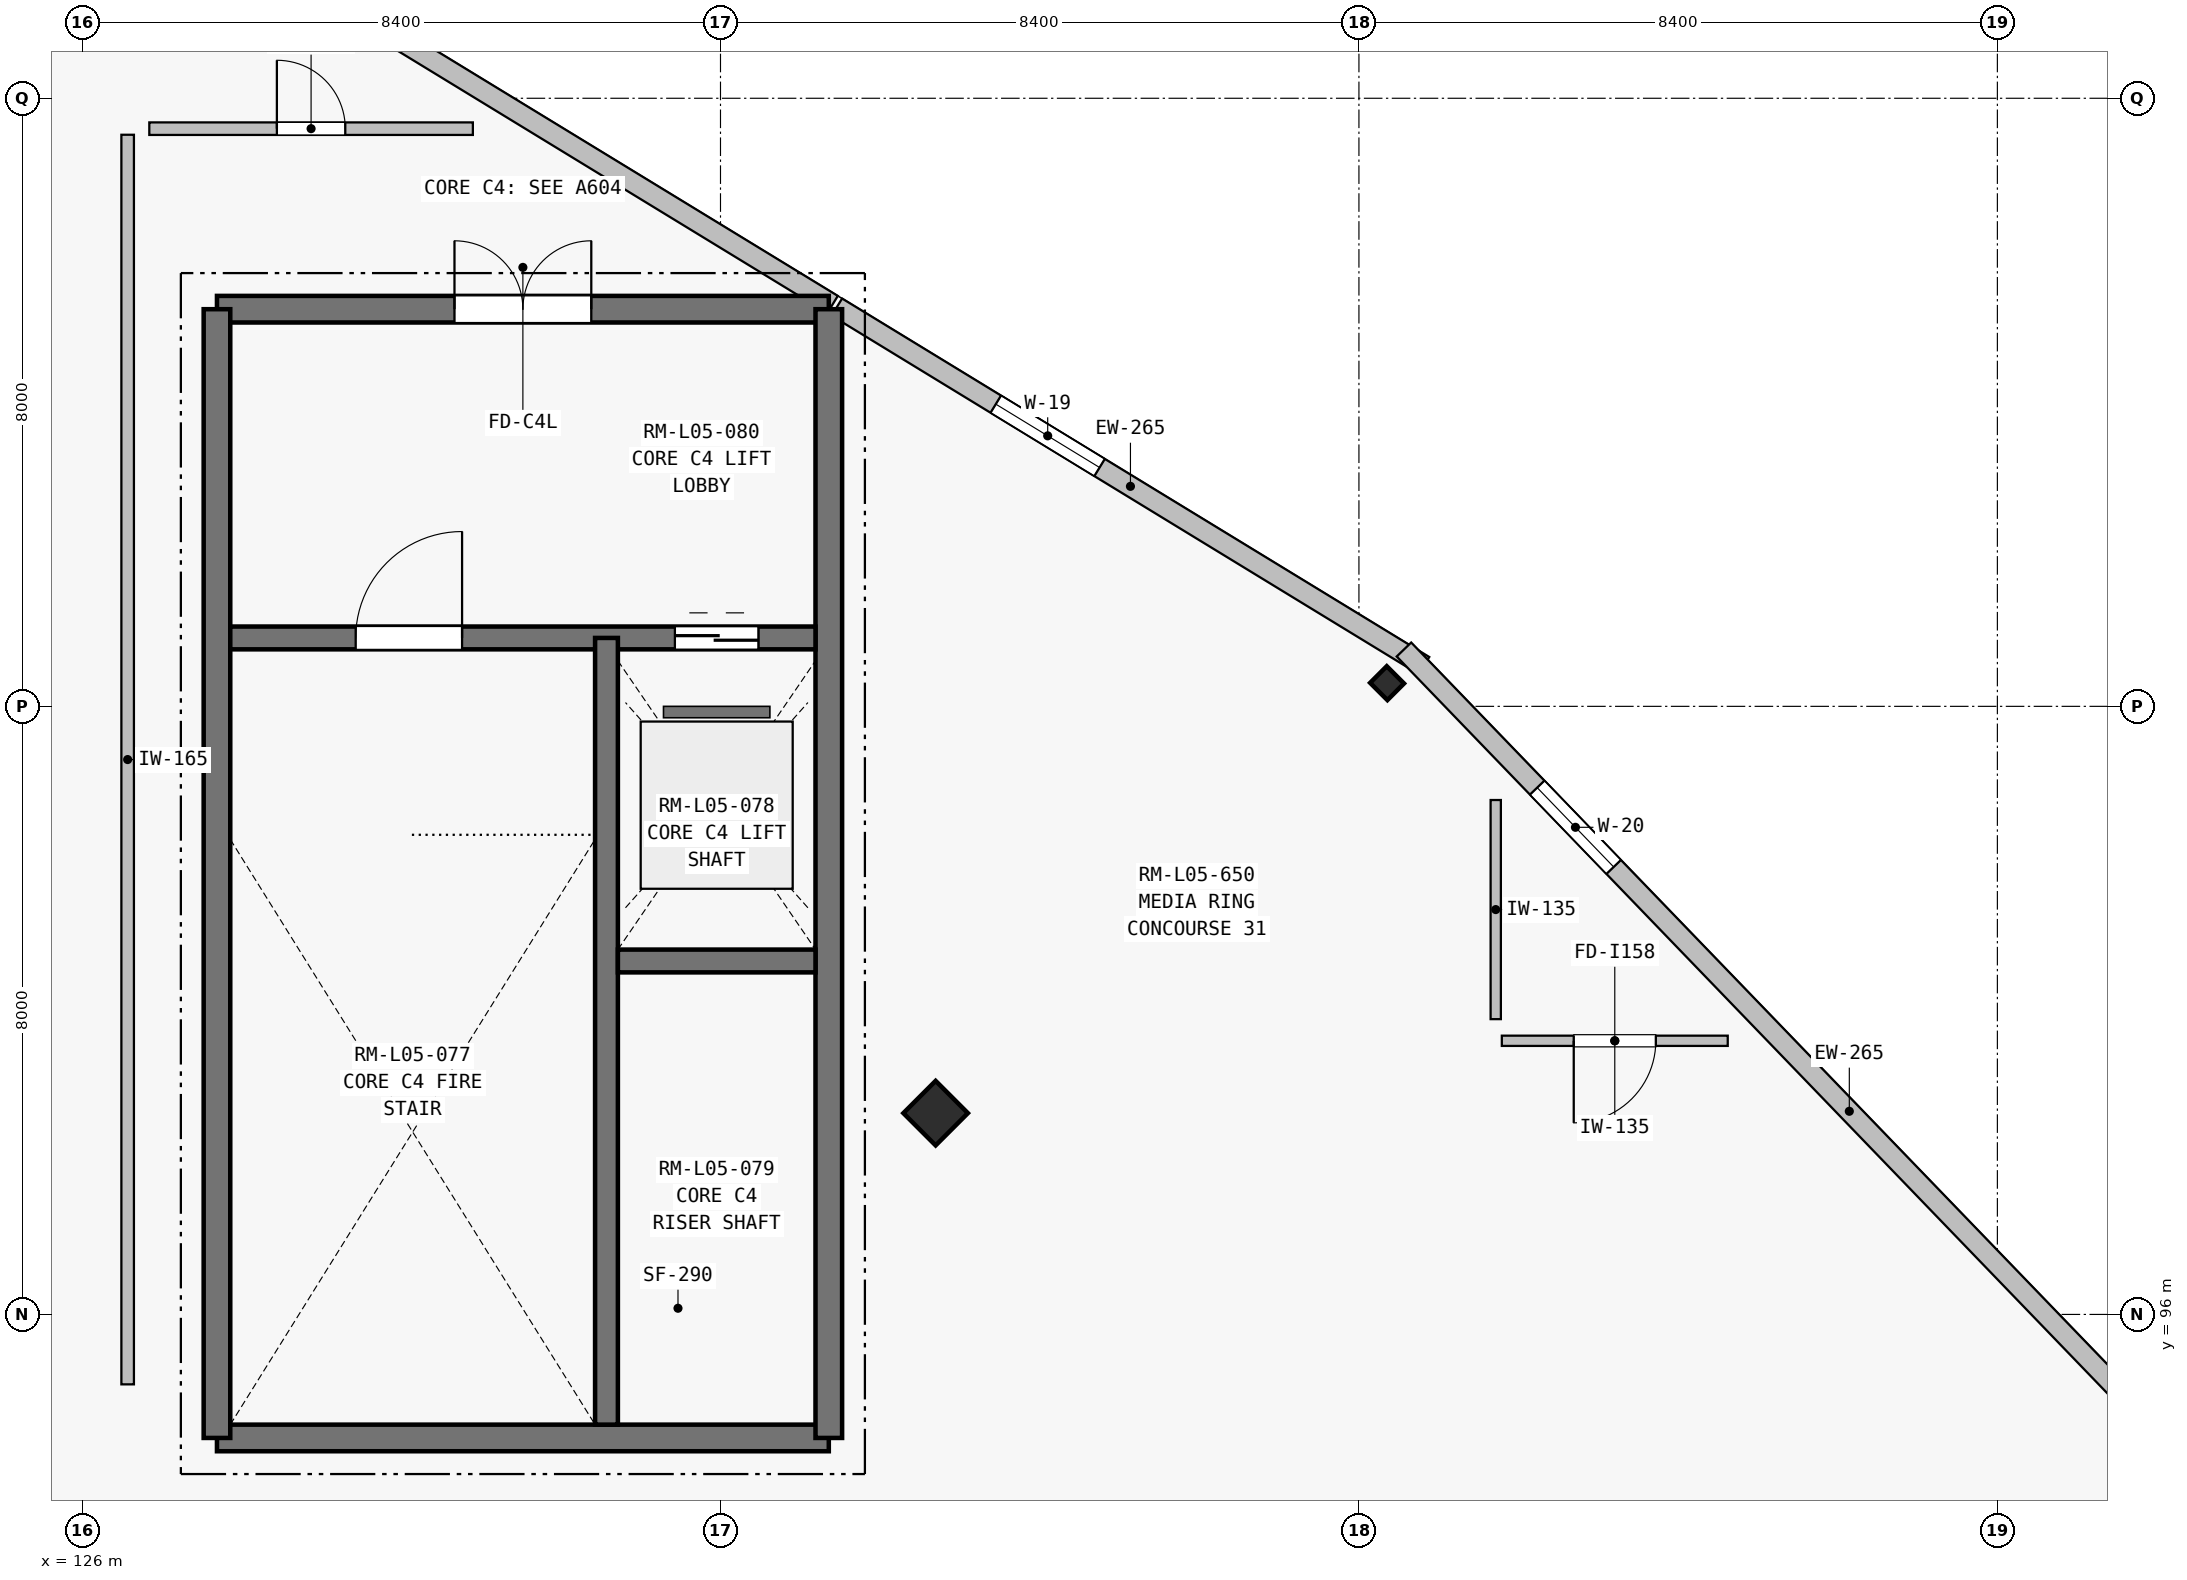
"""IFC4 building model, lengths in metres.
Left out: names, types, materials, properties, quantities, classifications, styles, units other than length and angle.
Written with IfcOpenShell. Run it as: python <this file> out.ifc"""

import sys

from ifc_helpers import new_model, si_unit, direction, frame, frame_2d, origin, origin_2d, place, context, subcontext, project, spatial, rectangle, i_section, extrude, element, fill, save


model = new_model("IFC4")
c1 = context("Model", 3, precision=1e-05, world=origin(), true_north=direction((0.0, 1.0)))
c2 = subcontext(c1, "Body", "Model", "MODEL_VIEW")
j1 = project(units=[si_unit("LENGTHUNIT", "METRE"), si_unit("PLANEANGLEUNIT", "RADIAN")], contexts=[c1])
p1 = place(None, origin())
s1 = spatial("IfcSite", under=j1, at=p1, CompositionType="ELEMENT")
p2 = place(p1, origin())
s2 = spatial("IfcBuilding", under=s1, at=p2, CompositionType="ELEMENT")
p3 = place(p2, frame((0.0, 0.0, 23.4)))
s3 = spatial("IfcBuildingStorey", under=s2, at=p3, CompositionType="ELEMENT", Elevation=23.4)
p4 = place(p3, frame((137.231, 98.648, 0.0), z_axis=(0.0, 0.0, 1.0), x_axis=(0.707106781187, 0.707106781187, 0.0)))
e1 = element("IfcColumn", 1, at=p4, inside=s3, PredefinedType="COLUMN", context=c2, shape_type="SweptSolid", body=[
    extrude(rectangle(XDim=0.6, YDim=0.6, at=origin_2d()), origin(), (0.0, 0.0, 1.0), 3.15),
])
p5 = place(p3, frame((143.17, 104.305, 0.0), z_axis=(0.0, 0.0, 1.0), x_axis=(0.707106781187, 0.707106781187, 0.0)))
e2 = element("IfcColumn", 2, at=p5, inside=s3, PredefinedType="COLUMN", context=c2, shape_type="SweptSolid", body=[
    extrude(i_section(OverallWidth=0.309, OverallDepth=0.321, WebThickness=0.014, FlangeThickness=0.022, at=origin_2d()), origin(), (0.0, 0.0, 1.0), 3.32),
])
p6 = place(p3, frame((128.4, 113.85, 0.0), z_axis=(0.0, 0.0, 1.0), x_axis=(0.85351467128, -0.521068811108, 0.0)))
e3 = element("IfcWall", 3, at=p6, inside=s3, PredefinedType="SOLIDWALL", context=c2, shape_type="SweptSolid", body=[
    extrude(rectangle(XDim=8.758, YDim=0.265, at=frame_2d((4.379, 0.0))), origin(), (0.0, 0.0, 1.0), 3.18),
])
p7 = place(p3, frame((135.931, 109.252, 0.0), z_axis=(0.0, 0.0, 1.0), x_axis=(0.853521769318, -0.52105718429, 0.0)))
e4 = element("IfcWall", 4, at=p7, inside=s3, PredefinedType="SOLIDWALL", context=c2, shape_type="SweptSolid", body=[
    extrude(rectangle(XDim=9.052, YDim=0.265, at=frame_2d((4.526, 0.0))), origin(), (0.0, 0.0, 1.0), 3.18),
])
p8 = place(p7, frame((2.45, 0.0, 0.9)))
e5 = element("IfcOpeningElement", 5, at=p8, cuts=e4, PredefinedType="OPENING", context=c2, shape_type="SweptSolid", body=[
    extrude(rectangle(XDim=1.6, YDim=1.45, at=frame_2d((0.8, 0.725))), frame((0.0, 0.142, 0.0), z_axis=(0.0, -1.0, 0.0), x_axis=(1.0, 0.0, 0.0)), (0.0, 0.0, 1.0), 0.285),
])
p9 = place(p3, frame((143.392, 104.748, 0.0), z_axis=(0.0, 0.0, 1.0), x_axis=(0.694213985366, -0.719768672924, 0.0)))
e6 = element("IfcWall", 6, at=p9, inside=s3, PredefinedType="SOLIDWALL", context=c2, shape_type="SweptSolid", body=[
    extrude(rectangle(XDim=16.881, YDim=0.265, at=frame_2d((8.441, 0.0))), origin(), (0.0, 0.0, 1.0), 3.18),
])
p10 = place(p9, frame((2.525, 0.0, 0.9)))
e7 = element("IfcOpeningElement", 7, at=p10, cuts=e6, PredefinedType="OPENING", context=c2, shape_type="SweptSolid", body=[
    extrude(rectangle(XDim=1.45, YDim=1.4, at=frame_2d((0.725, 0.7))), frame((0.0, 0.142, 0.0), z_axis=(0.0, -1.0, 0.0), x_axis=(1.0, 0.0, 0.0)), (0.0, 0.0, 1.0), 0.285),
])
p11 = place(p3, frame((127.775, 94.375, 0.0), z_axis=(0.0, 0.0, 1.0), x_axis=(1.0, 0.0, 0.0)))
e8 = element("IfcWall", 8, at=p11, inside=s3, PredefinedType="SHEAR", context=c2, shape_type="SweptSolid", body=[
    extrude(rectangle(XDim=8.05, YDim=0.35, at=frame_2d((4.025, 0.0))), origin(), (0.0, 0.0, 1.0), 3.08),
])
p12 = place(p3, frame((127.775, 109.225, 0.0), z_axis=(0.0, 0.0, 1.0), x_axis=(1.0, 0.0, 0.0)))
e9 = element("IfcWall", 9, at=p12, inside=s3, PredefinedType="SHEAR", context=c2, shape_type="SweptSolid", body=[
    extrude(rectangle(XDim=8.05, YDim=0.35, at=frame_2d((4.025, 0.0))), origin(), (0.0, 0.0, 1.0), 3.08),
])
p13 = place(p12, frame((3.125, 0.0, 0.0)))
e10 = element("IfcOpeningElement", 10, at=p13, cuts=e9, PredefinedType="OPENING", context=c2, shape_type="SweptSolid", body=[
    extrude(rectangle(XDim=1.8, YDim=2.25, at=frame_2d((0.9, 1.125))), frame((0.0, 0.185, 0.0), z_axis=(0.0, -1.0, 0.0), x_axis=(1.0, 0.0, 0.0)), (0.0, 0.0, 1.0), 0.37),
])
for number, where, z_axis, x_axis in (
    (11, (127.775, 94.375, 0.0), (0.0, 0.0, 1.0), (0.0, 1.0, 0.0)),
    (12, (135.825, 94.375, 0.0), (0.0, 0.0, 1.0), (0.0, 1.0, 0.0)),
):
    element("IfcWall", number, at=place(p3, frame(where, z_axis=z_axis, x_axis=x_axis)), inside=s3, PredefinedType="SHEAR", context=c2, shape_type="SweptSolid", body=[
        extrude(rectangle(XDim=14.85, YDim=0.35, at=frame_2d((7.425, 0.0))), origin(), (0.0, 0.0, 1.0), 3.08),
    ])
p14 = place(p3, frame((127.95, 104.9, 0.0), z_axis=(0.0, 0.0, 1.0), x_axis=(1.0, 0.0, 0.0)))
e13 = element("IfcWall", 13, at=p14, inside=s3, PredefinedType="SHEAR", context=c2, shape_type="SweptSolid", body=[
    extrude(rectangle(XDim=7.7, YDim=0.3, at=frame_2d((3.85, 0.0))), origin(), (0.0, 0.0, 1.0), 3.08),
])
p15 = place(p14, frame((1.65, 0.0, 0.0)))
e14 = element("IfcOpeningElement", 14, at=p15, cuts=e13, PredefinedType="OPENING", context=c2, shape_type="SweptSolid", body=[
    extrude(rectangle(XDim=1.4, YDim=2.2, at=frame_2d((0.7, 1.1))), frame((0.0, 0.16, 0.0), z_axis=(0.0, -1.0, 0.0), x_axis=(1.0, 0.0, 0.0)), (0.0, 0.0, 1.0), 0.32),
])
p16 = place(p14, frame((5.85, 0.0, 0.0)))
e15 = element("IfcOpeningElement", 15, at=p16, cuts=e13, PredefinedType="OPENING", context=c2, shape_type="SweptSolid", body=[
    extrude(rectangle(XDim=1.1, YDim=2.2, at=frame_2d((0.55, 1.1))), frame((0.0, 0.16, 0.0), z_axis=(0.0, -1.0, 0.0), x_axis=(1.0, 0.0, 0.0)), (0.0, 0.0, 1.0), 0.32),
])
p17 = place(p3, frame((132.9, 94.55, 0.0), z_axis=(0.0, 0.0, 1.0), x_axis=(0.0, 1.0, 0.0)))
e16 = element("IfcWall", 16, at=p17, inside=s3, PredefinedType="SHEAR", context=c2, shape_type="SweptSolid", body=[
    extrude(rectangle(XDim=10.35, YDim=0.3, at=frame_2d((5.175, 0.0))), origin(), (0.0, 0.0, 1.0), 3.08),
])
p18 = place(p3, frame((133.05, 100.65, 0.0), z_axis=(0.0, 0.0, 1.0), x_axis=(1.0, 0.0, 0.0)))
e17 = element("IfcWall", 17, at=p18, inside=s3, PredefinedType="SHEAR", context=c2, shape_type="SweptSolid", body=[
    extrude(rectangle(XDim=2.6, YDim=0.3, at=frame_2d((1.3, 0.0))), origin(), (0.0, 0.0, 1.0), 3.08),
])
p19 = place(p3, frame((126.6, 95.08, 0.0), z_axis=(0.0, 0.0, 1.0), x_axis=(0.0, 1.0, 0.0)))
e18 = element("IfcWall", 18, at=p19, inside=s3, PredefinedType="PARTITIONING", context=c2, shape_type="SweptSolid", body=[
    extrude(rectangle(XDim=16.44, YDim=0.165, at=frame_2d((8.22, 0.0))), origin(), (0.0, 0.0, 1.0), 2.445),
])
p20 = place(p3, frame((126.885, 111.6, 0.0), z_axis=(0.0, 0.0, 1.0), x_axis=(1.0, 0.0, 0.0)))
e19 = element("IfcWall", 19, at=p20, inside=s3, PredefinedType="PARTITIONING", context=c2, shape_type="SweptSolid", body=[
    extrude(rectangle(XDim=4.257, YDim=0.165, at=frame_2d((2.129, 0.0))), origin(), (0.0, 0.0, 1.0), 2.5),
])
p21 = place(p20, frame((1.679, 0.0, 0.0)))
e20 = element("IfcOpeningElement", 20, at=p21, cuts=e19, PredefinedType="OPENING", context=c2, shape_type="SweptSolid", body=[
    extrude(rectangle(XDim=0.9, YDim=2.1, at=frame_2d((0.45, 1.05))), frame((0.0, 0.093, 0.0), z_axis=(0.0, -1.0, 0.0), x_axis=(1.0, 0.0, 0.0)), (0.0, 0.0, 1.0), 0.185),
])
p22 = place(p3, frame((147.652, 99.6, 0.0), z_axis=(0.0, 0.0, 1.0), x_axis=(-1.0, 0.0, 0.0)))
e21 = element("IfcWall", 21, at=p22, inside=s3, PredefinedType="PARTITIONING", context=c2, shape_type="SweptSolid", body=[
    extrude(rectangle(XDim=2.972, YDim=0.135, at=frame_2d((1.486, 0.0))), origin(), (0.0, 0.0, 1.0), 2.5),
])
p23 = place(p22, frame((0.946, 0.0, 0.0)))
e22 = element("IfcOpeningElement", 22, at=p23, cuts=e21, PredefinedType="OPENING", context=c2, shape_type="SweptSolid", body=[
    extrude(rectangle(XDim=1.08, YDim=2.15, at=frame_2d((0.54, 1.075))), frame((0.0, 0.077, 0.0), z_axis=(0.0, -1.0, 0.0), x_axis=(1.0, 0.0, 0.0)), (0.0, 0.0, 1.0), 0.155),
])
p24 = place(p3, frame((144.6, 99.885, 0.0), z_axis=(0.0, 0.0, 1.0), x_axis=(0.0, 1.0, 0.0)))
e23 = element("IfcWall", 23, at=p24, inside=s3, PredefinedType="PARTITIONING", context=c2, shape_type="SweptSolid", body=[
    extrude(rectangle(XDim=2.883, YDim=0.135, at=frame_2d((1.441, 0.0))), origin(), (0.0, 0.0, 1.0), 2.5),
])
p25 = place(p8, origin())
e24 = element("IfcWindow", 24, at=p25, inside=s3, PartitioningType="SINGLE_PANEL", PredefinedType="WINDOW", context=c2, shape_type="SweptSolid", body=[
    extrude(rectangle(XDim=1.6, YDim=1.45, at=frame_2d((0.8, 0.725))), frame((0.0, 0.03, 0.0), z_axis=(0.0, -1.0, 0.0), x_axis=(1.0, 0.0, 0.0)), (0.0, 0.0, 1.0), 0.06),
])
fill(e5, e24)
p26 = place(p10, origin())
e25 = element("IfcWindow", 25, at=p26, inside=s3, PartitioningType="SINGLE_PANEL", PredefinedType="WINDOW", context=c2, shape_type="SweptSolid", body=[
    extrude(rectangle(XDim=1.45, YDim=1.4, at=frame_2d((0.725, 0.7))), frame((0.0, 0.03, 0.0), z_axis=(0.0, -1.0, 0.0), x_axis=(1.0, 0.0, 0.0)), (0.0, 0.0, 1.0), 0.06),
])
fill(e7, e25)
p27 = place(p13, origin())
e26 = element("IfcDoor", 26, at=p27, inside=s3, OperationType="DOUBLE_DOOR_SINGLE_SWING", PredefinedType="DOOR", context=c2, shape_type="SweptSolid", body=[
    extrude(rectangle(XDim=1.8, YDim=2.25, at=frame_2d((0.9, 1.125))), frame((0.0, 0.025, 0.0), z_axis=(0.0, -1.0, 0.0), x_axis=(1.0, 0.0, 0.0)), (0.0, 0.0, 1.0), 0.05),
])
fill(e10, e26)
p28 = place(p15, origin())
e27 = element("IfcDoor", 27, at=p28, inside=s3, OperationType="SINGLE_SWING_RIGHT", PredefinedType="DOOR", context=c2, shape_type="SweptSolid", body=[
    extrude(rectangle(XDim=1.4, YDim=2.2, at=frame_2d((0.7, 1.1))), frame((0.0, 0.025, 0.0), z_axis=(0.0, -1.0, 0.0), x_axis=(1.0, 0.0, 0.0)), (0.0, 0.0, 1.0), 0.05),
])
fill(e14, e27)
p29 = place(p16, origin())
e28 = element("IfcDoor", 28, at=p29, inside=s3, OperationType="SLIDING_TO_LEFT", PredefinedType="DOOR", context=c2, shape_type="SweptSolid", body=[
    extrude(rectangle(XDim=1.1, YDim=2.2, at=frame_2d((0.55, 1.1))), frame((0.0, 0.025, 0.0), z_axis=(0.0, -1.0, 0.0), x_axis=(1.0, 0.0, 0.0)), (0.0, 0.0, 1.0), 0.05),
])
fill(e15, e28)
p30 = place(p21, origin())
e29 = element("IfcDoor", 29, at=p30, inside=s3, OperationType="SINGLE_SWING_LEFT", PredefinedType="DOOR", context=c2, shape_type="SweptSolid", body=[
    extrude(rectangle(XDim=0.9, YDim=2.1, at=frame_2d((0.45, 1.05))), frame((0.0, 0.025, 0.0), z_axis=(0.0, -1.0, 0.0), x_axis=(1.0, 0.0, 0.0)), (0.0, 0.0, 1.0), 0.05),
])
fill(e20, e29)
p31 = place(p23, origin())
e30 = element("IfcDoor", 30, at=p31, inside=s3, OperationType="SINGLE_SWING_RIGHT", PredefinedType="DOOR", context=c2, shape_type="SweptSolid", body=[
    extrude(rectangle(XDim=1.08, YDim=2.15, at=frame_2d((0.54, 1.075))), frame((0.0, 0.025, 0.0), z_axis=(0.0, -1.0, 0.0), x_axis=(1.0, 0.0, 0.0)), (0.0, 0.0, 1.0), 0.05),
])
fill(e22, e30)
save(model, sys.argv[1])
